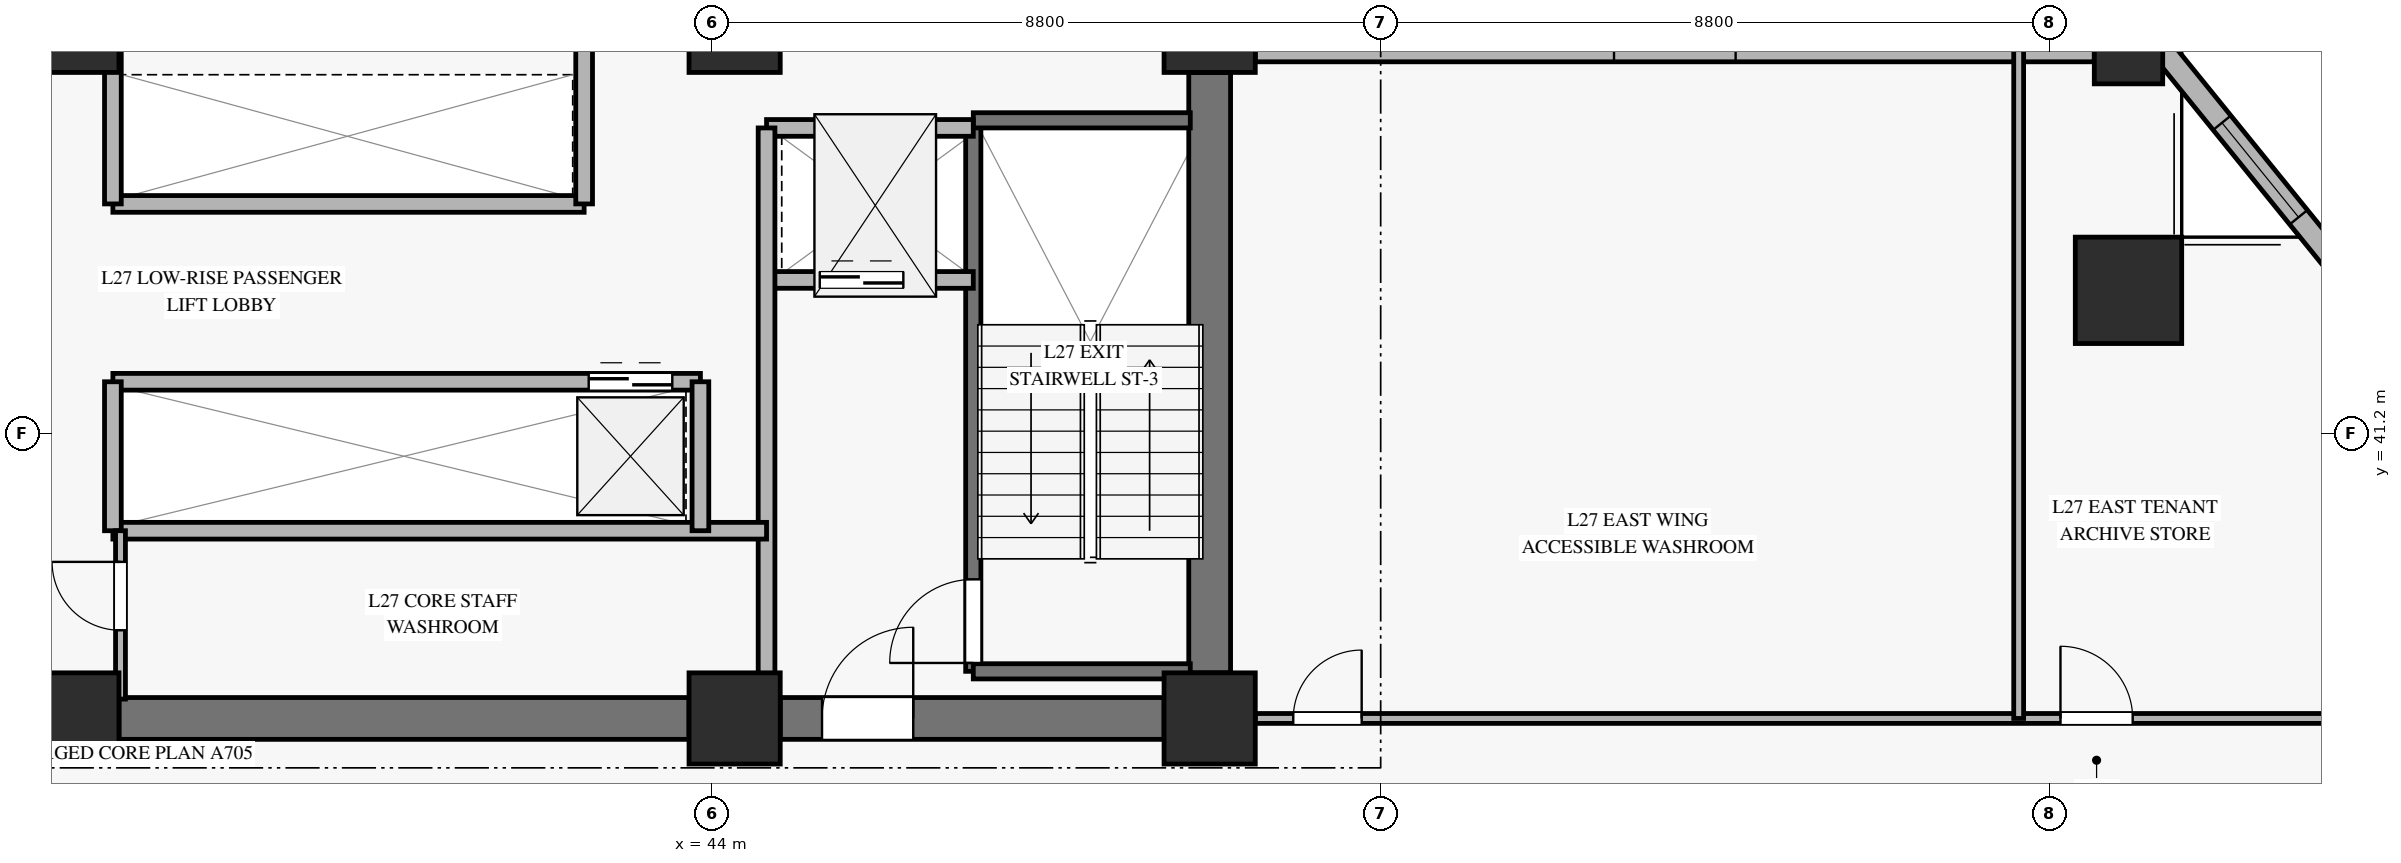
"""IFC4 building model, lengths in metres.
Left out: names, types, materials, properties, quantities, classifications, styles, units other than length and angle.
Written with IfcOpenShell. Run it as: python <this file> out.ifc"""

import sys

from ifc_helpers import new_model, si_unit, direction, frame, frame_2d, origin, origin_2d, place, context, subcontext, project, spatial, rectangle, hollow_rectangle, extrude, source, transform, mapped, element, fill, save


model = new_model("IFC4")
c1 = context("Model", 3, precision=1e-05, world=origin(), true_north=direction((0.0, 1.0)))
c2 = subcontext(c1, "Body", "Model", "MODEL_VIEW")
j1 = project(units=[si_unit("LENGTHUNIT", "METRE"), si_unit("PLANEANGLEUNIT", "RADIAN")], contexts=[c1])
p1 = place(None, origin())
s1 = spatial("IfcSite", under=j1, at=p1, CompositionType="ELEMENT")
p2 = place(p1, origin())
s2 = spatial("IfcBuilding", under=s1, at=p2, CompositionType="ELEMENT")
p3 = place(p2, frame((0.0, 0.0, 111.4)))
s3 = spatial("IfcBuildingStorey", under=s2, at=p3, CompositionType="ELEMENT", Elevation=111.4)
m1 = source(origin(), c2, "Body", "SweptSolid", [
    extrude(rectangle(XDim=1.2, YDim=1.2, at=origin_2d()), origin(), (0.0, 0.0, 1.0), 3.68),
])
for number, where, z_axis, x_axis in (
    (1, (35.6, 37.45, 0.0), (0.0, 0.0, 1.0), (1.0, 0.0, 0.0)),
    (2, (35.6, 46.55, 0.0), (0.0, 0.0, 1.0), (1.0, 0.0, 0.0)),
    (3, (44.3, 37.45, 0.0), (0.0, 0.0, 1.0), (1.0, 0.0, 0.0)),
    (4, (44.3, 46.55, 0.0), (0.0, 0.0, 1.0), (1.0, 0.0, 0.0)),
    (5, (50.55, 37.45, 0.0), (0.0, 0.0, 1.0), (1.0, 0.0, 0.0)),
    (6, (50.55, 46.55, 0.0), (0.0, 0.0, 1.0), (1.0, 0.0, 0.0)),
):
    element("IfcColumn", number, at=place(p3, frame(where, z_axis=z_axis, x_axis=x_axis)), inside=s3, PredefinedType="PILASTER", context=c2, shape_type="MappedRepresentation", body=[
        mapped(m1, transform((0.0, 0.0, 0.0), x_axis=(1.0, 0.0, 0.0), y_axis=(0.0, 1.0, 0.0), z_axis=(0.0, 0.0, 1.0), scale=1.0)),
    ])
p4 = place(p3, frame((36.2, 37.45, 0.0), z_axis=(0.0, 0.0, 1.0), x_axis=(1.0, 0.0, 0.0)))
e7 = element("IfcWall", 7, at=p4, inside=s3, PredefinedType="SHEAR", context=c2, shape_type="SweptSolid", body=[
    extrude(rectangle(XDim=7.5, YDim=0.55, at=frame_2d((3.75, 0.0))), origin(), (0.0, 0.0, 1.0), 3.68),
])
p5 = place(p3, frame((44.9, 37.45, 0.0), z_axis=(0.0, 0.0, 1.0), x_axis=(1.0, 0.0, 0.0)))
e8 = element("IfcWall", 8, at=p5, inside=s3, PredefinedType="SHEAR", context=c2, shape_type="SweptSolid", body=[
    extrude(rectangle(XDim=5.05, YDim=0.55, at=frame_2d((2.525, 0.0))), origin(), (0.0, 0.0, 1.0), 3.68),
])
p6 = place(p5, frame((0.55, 0.0, 0.0)))
e9 = element("IfcOpeningElement", 9, at=p6, cuts=e8, PredefinedType="OPENING", context=c2, shape_type="SweptSolid", body=[
    extrude(rectangle(XDim=1.2, YDim=2.15, at=frame_2d((0.6, 1.075))), frame((0.0, 0.285, 0.0), z_axis=(0.0, -1.0, 0.0), x_axis=(1.0, 0.0, 0.0)), (0.0, 0.0, 1.0), 0.57),
])
p7 = place(p3, frame((50.55, 38.05, 0.0), z_axis=(0.0, 0.0, 1.0), x_axis=(0.0, 1.0, 0.0)))
e10 = element("IfcWall", 10, at=p7, inside=s3, PredefinedType="SHEAR", context=c2, shape_type="SweptSolid", body=[
    extrude(rectangle(XDim=7.9, YDim=0.55, at=frame_2d((3.95, 0.0))), origin(), (0.0, 0.0, 1.0), 3.68),
])
m2 = source(origin(), c2, "Body", "SweptSolid", [
    extrude(hollow_rectangle(XDim=1.4, YDim=1.4, WallThickness=0.065, at=origin_2d()), origin(), (0.0, 0.0, 1.0), 3.68),
])
p8 = place(p3, frame((62.639, 43.083, 0.0), z_axis=(0.0, 0.0, 1.0), x_axis=(1.0, 0.0, 0.0)))
e11 = element("IfcColumn", 11, at=p8, inside=s3, PredefinedType="COLUMN", context=c2, shape_type="MappedRepresentation", body=[
    mapped(m2, transform((0.0, 0.0, 0.0), x_axis=(1.0, 0.0, 0.0), y_axis=(0.0, 1.0, 0.0), z_axis=(0.0, 0.0, 1.0), scale=1.0)),
])
m3 = source(origin(), c2, "Body", "SweptSolid", [
    extrude(hollow_rectangle(XDim=0.9, YDim=0.9, WallThickness=0.04, at=origin_2d()), origin(), (0.0, 0.0, 1.0), 3.68),
])
p9 = place(p3, frame((62.639, 46.25, 0.0), z_axis=(0.0, 0.0, 1.0), x_axis=(1.0, 0.0, 0.0)))
e12 = element("IfcColumn", 12, at=p9, inside=s3, PredefinedType="COLUMN", context=c2, shape_type="MappedRepresentation", body=[
    mapped(m3, transform((0.0, 0.0, 0.0), x_axis=(1.0, 0.0, 0.0), y_axis=(0.0, 1.0, 0.0), z_axis=(0.0, 0.0, 1.0), scale=1.0)),
])
p10 = place(p3, frame((51.15, 46.25, 0.0), z_axis=(0.0, 0.0, 1.0), x_axis=(1.0, 0.0, 0.0)))
e13 = element("IfcWall", 13, at=p10, inside=s3, PredefinedType="SOLIDWALL", context=c2, shape_type="SweptSolid", body=[
    extrude(rectangle(XDim=11.039, YDim=0.32, at=frame_2d((5.52, 0.0))), origin(), (0.0, 0.0, 1.0), 3.16),
])
p11 = place(p10, frame((4.72, 0.0, 0.45)))
e14 = element("IfcOpeningElement", 14, at=p11, cuts=e13, PredefinedType="OPENING", context=c2, shape_type="SweptSolid", body=[
    extrude(rectangle(XDim=1.6, YDim=2.0, at=frame_2d((0.8, 1.0))), frame((0.0, 0.17, 0.0), z_axis=(0.0, -1.0, 0.0), x_axis=(1.0, 0.0, 0.0)), (0.0, 0.0, 1.0), 0.34),
])
p12 = place(p3, frame((65.656, 43.083, 0.0), z_axis=(0.0, 0.0, 1.0), x_axis=(-0.629663274091, 0.776868174957, 0.0)))
e15 = element("IfcWall", 15, at=p12, inside=s3, PredefinedType="SOLIDWALL", context=c2, shape_type="SweptSolid", body=[
    extrude(rectangle(XDim=4.077, YDim=0.3, at=frame_2d((2.038, 0.0))), origin(), (0.0, 0.0, 1.0), 3.16),
])
p13 = place(p12, frame((1.238, 0.0, 0.45)))
e16 = element("IfcOpeningElement", 16, at=p13, cuts=e15, PredefinedType="OPENING", context=c2, shape_type="SweptSolid", body=[
    extrude(rectangle(XDim=1.6, YDim=2.0, at=frame_2d((0.8, 1.0))), frame((0.0, 0.16, 0.0), z_axis=(0.0, -1.0, 0.0), x_axis=(1.0, 0.0, 0.0)), (0.0, 0.0, 1.0), 0.32),
])
p14 = place(p3, frame((47.44, 38.07, 0.0), z_axis=(0.0, 0.0, 1.0), x_axis=(0.0, 1.0, 0.0)))
e17 = element("IfcWall", 17, at=p14, inside=s3, PredefinedType="SOLIDWALL", context=c2, shape_type="SweptSolid", body=[
    extrude(rectangle(XDim=7.25, YDim=0.2, at=frame_2d((3.625, 0.0))), origin(), (0.0, 0.0, 1.0), 3.9),
])
p15 = place(p14, frame((0.11, 0.0, 0.0)))
e18 = element("IfcOpeningElement", 18, at=p15, cuts=e17, PredefinedType="OPENING", context=c2, shape_type="SweptSolid", body=[
    extrude(rectangle(XDim=1.1, YDim=2.15, at=frame_2d((0.55, 1.075))), frame((0.0, 0.11, 0.0), z_axis=(0.0, -1.0, 0.0), x_axis=(1.0, 0.0, 0.0)), (0.0, 0.0, 1.0), 0.22),
])
for number, where, z_axis, x_axis in (
    (19, (47.44, 45.32, 0.0), (0.0, 0.0, 1.0), (1.0, 0.0, 0.0)),
    (20, (47.44, 38.07, 0.0), (0.0, 0.0, 1.0), (1.0, 0.0, 0.0)),
):
    element("IfcWall", number, at=place(p3, frame(where, z_axis=z_axis, x_axis=x_axis)), inside=s3, PredefinedType="SOLIDWALL", context=c2, shape_type="SweptSolid", body=[
        extrude(rectangle(XDim=2.855, YDim=0.2, at=frame_2d((1.427, 0.0))), origin(), (0.0, 0.0, 1.0), 3.9),
    ])
p16 = place(p3, frame((44.72, 43.22, 0.0), z_axis=(0.0, 0.0, 1.0), x_axis=(1.0, 0.0, 0.0)))
e21 = element("IfcWall", 21, at=p16, inside=s3, PredefinedType="SOLIDWALL", context=c2, shape_type="SweptSolid", body=[
    extrude(rectangle(XDim=2.72, YDim=0.22, at=frame_2d((1.36, 0.0))), origin(), (0.0, 0.0, 1.0), 3.68),
])
p17 = place(p16, frame((0.7, 0.0, 0.0)))
e22 = element("IfcOpeningElement", 22, at=p17, cuts=e21, PredefinedType="OPENING", context=c2, shape_type="SweptSolid", body=[
    extrude(rectangle(XDim=1.1, YDim=2.2, at=frame_2d((0.55, 1.1))), frame((0.0, 0.12, 0.0), z_axis=(0.0, -1.0, 0.0), x_axis=(1.0, 0.0, 0.0)), (0.0, 0.0, 1.0), 0.24),
])
p18 = place(p3, frame((44.72, 45.22, 0.0), z_axis=(0.0, 0.0, 1.0), x_axis=(1.0, 0.0, 0.0)))
e23 = element("IfcWall", 23, at=p18, inside=s3, PredefinedType="SOLIDWALL", context=c2, shape_type="SweptSolid", body=[
    extrude(rectangle(XDim=2.72, YDim=0.22, at=frame_2d((1.36, 0.0))), origin(), (0.0, 0.0, 1.0), 3.68),
])
p19 = place(p3, frame((44.72, 37.705, 0.0), z_axis=(0.0, 0.0, 1.0), x_axis=(0.0, 1.0, 0.0)))
e24 = element("IfcWall", 24, at=p19, inside=s3, PredefinedType="SOLIDWALL", context=c2, shape_type="SweptSolid", body=[
    extrude(rectangle(XDim=7.515, YDim=0.22, at=frame_2d((3.757, 0.0))), origin(), (0.0, 0.0, 1.0), 3.68),
])
p20 = place(p3, frame((36.12, 44.22, 0.0), z_axis=(0.0, 0.0, 1.0), x_axis=(1.0, 0.0, 0.0)))
e25 = element("IfcWall", 25, at=p20, inside=s3, PredefinedType="SOLIDWALL", context=c2, shape_type="SweptSolid", body=[
    extrude(rectangle(XDim=6.2, YDim=0.22, at=frame_2d((3.1, 0.0))), origin(), (0.0, 0.0, 1.0), 3.68),
])
for number, where, z_axis, x_axis in (
    (26, (36.12, 44.22, 0.0), (0.0, 0.0, 1.0), (0.0, 1.0, 0.0)),
    (27, (42.32, 44.22, 0.0), (0.0, 0.0, 1.0), (0.0, 1.0, 0.0)),
):
    element("IfcWall", number, at=place(p3, frame(where, z_axis=z_axis, x_axis=x_axis)), inside=s3, PredefinedType="SOLIDWALL", context=c2, shape_type="SweptSolid", body=[
        extrude(rectangle(XDim=2.075, YDim=0.22, at=frame_2d((1.038, 0.0))), origin(), (0.0, 0.0, 1.0), 3.68),
    ])
p21 = place(p3, frame((36.12, 41.88, 0.0), z_axis=(0.0, 0.0, 1.0), x_axis=(1.0, 0.0, 0.0)))
e28 = element("IfcWall", 28, at=p21, inside=s3, PredefinedType="SOLIDWALL", context=c2, shape_type="SweptSolid", body=[
    extrude(rectangle(XDim=7.73, YDim=0.22, at=frame_2d((3.865, 0.0))), origin(), (0.0, 0.0, 1.0), 3.68),
])
p22 = place(p21, frame((6.26, 0.0, 0.0)))
e29 = element("IfcOpeningElement", 29, at=p22, cuts=e28, PredefinedType="OPENING", context=c2, shape_type="SweptSolid", body=[
    extrude(rectangle(XDim=1.1, YDim=2.2, at=frame_2d((0.55, 1.1))), frame((0.0, 0.12, 0.0), z_axis=(0.0, -1.0, 0.0), x_axis=(1.0, 0.0, 0.0)), (0.0, 0.0, 1.0), 0.24),
])
p23 = place(p3, frame((36.12, 39.92, 0.0), z_axis=(0.0, 0.0, 1.0), x_axis=(1.0, 0.0, 0.0)))
e30 = element("IfcWall", 30, at=p23, inside=s3, PredefinedType="SOLIDWALL", context=c2, shape_type="SweptSolid", body=[
    extrude(rectangle(XDim=8.6, YDim=0.22, at=frame_2d((4.3, 0.0))), origin(), (0.0, 0.0, 1.0), 2.965),
])
for number, where, z_axis, x_axis in (
    (31, (36.12, 39.92, 0.0), (0.0, 0.0, 1.0), (0.0, 1.0, 0.0)),
    (32, (43.85, 39.92, 0.0), (0.0, 0.0, 1.0), (0.0, 1.0, 0.0)),
):
    element("IfcWall", number, at=place(p3, frame(where, z_axis=z_axis, x_axis=x_axis)), inside=s3, PredefinedType="SOLIDWALL", context=c2, shape_type="SweptSolid", body=[
        extrude(rectangle(XDim=1.96, YDim=0.22, at=frame_2d((0.98, 0.0))), origin(), (0.0, 0.0, 1.0), 3.68),
    ])
p24 = place(p3, frame((36.22, 37.705, 0.0), z_axis=(0.0, 0.0, 1.0), x_axis=(0.0, 1.0, 0.0)))
e33 = element("IfcWall", 33, at=p24, inside=s3, PredefinedType="PARTITIONING", context=c2, shape_type="SweptSolid", body=[
    extrude(rectangle(XDim=2.215, YDim=0.13, at=frame_2d((1.107, 0.0))), origin(), (0.0, 0.0, 1.0), 3.68),
])
p25 = place(p24, frame((0.905, 0.0, 0.0)))
e34 = element("IfcOpeningElement", 34, at=p25, cuts=e33, PredefinedType="OPENING", context=c2, shape_type="SweptSolid", body=[
    extrude(rectangle(XDim=0.9, YDim=2.1, at=frame_2d((0.45, 1.05))), frame((0.0, 0.075, 0.0), z_axis=(0.0, -1.0, 0.0), x_axis=(1.0, 0.0, 0.0)), (0.0, 0.0, 1.0), 0.15),
])
p26 = place(p3, frame((51.15, 37.45, 0.0), z_axis=(0.0, 0.0, 1.0), x_axis=(1.0, 0.0, 0.0)))
e35 = element("IfcWall", 35, at=p26, inside=s3, PredefinedType="PARTITIONING", context=c2, shape_type="SweptSolid", body=[
    extrude(rectangle(XDim=14.506, YDim=0.13, at=frame_2d((7.253, 0.0))), origin(), (0.0, 0.0, 1.0), 3.165),
])
p27 = place(p26, frame((0.5, 0.0, 0.0)))
e36 = element("IfcOpeningElement", 36, at=p27, cuts=e35, PredefinedType="OPENING", context=c2, shape_type="SweptSolid", body=[
    extrude(rectangle(XDim=0.9, YDim=2.1, at=frame_2d((0.45, 1.05))), frame((0.0, 0.075, 0.0), z_axis=(0.0, -1.0, 0.0), x_axis=(1.0, 0.0, 0.0)), (0.0, 0.0, 1.0), 0.15),
])
p28 = place(p26, frame((10.594, 0.0, 0.0)))
e37 = element("IfcOpeningElement", 37, at=p28, cuts=e35, PredefinedType="OPENING", context=c2, shape_type="SweptSolid", body=[
    extrude(rectangle(XDim=0.95, YDim=2.1, at=frame_2d((0.475, 1.05))), frame((0.0, 0.075, 0.0), z_axis=(0.0, -1.0, 0.0), x_axis=(1.0, 0.0, 0.0)), (0.0, 0.0, 1.0), 0.15),
])
p29 = place(p3, frame((61.194, 37.45, 0.0), z_axis=(0.0, 0.0, 1.0), x_axis=(0.0, 1.0, 0.0)))
e38 = element("IfcWall", 38, at=p29, inside=s3, PredefinedType="PARTITIONING", context=c2, shape_type="SweptSolid", body=[
    extrude(rectangle(XDim=8.8, YDim=0.13, at=frame_2d((4.4, 0.0))), origin(), (0.0, 0.0, 1.0), 3.68),
])
m4 = source(origin(), c2, "Body", "SweptSolid", [
    extrude(rectangle(XDim=1.6, YDim=2.0, at=frame_2d((0.8, 1.0))), frame((0.0, 0.03, 0.0), z_axis=(0.0, -1.0, 0.0), x_axis=(1.0, 0.0, 0.0)), (0.0, 0.0, 1.0), 0.06),
])
p30 = place(p13, origin())
e39 = element("IfcWindow", 39, at=p30, inside=s3, PartitioningType="SINGLE_PANEL", PredefinedType="WINDOW", context=c2, shape_type="MappedRepresentation", body=[
    mapped(m4, transform((0.0, 0.0, 0.0), x_axis=(1.0, 0.0, 0.0), y_axis=(0.0, 1.0, 0.0), z_axis=(0.0, 0.0, 1.0), scale=1.0)),
])
fill(e16, e39)
m5 = source(origin(), c2, "Body", "SweptSolid", [
    extrude(rectangle(XDim=1.1, YDim=2.15, at=frame_2d((0.55, 1.075))), frame((0.0, 0.025, 0.0), z_axis=(0.0, -1.0, 0.0), x_axis=(1.0, 0.0, 0.0)), (0.0, 0.0, 1.0), 0.05),
])
p31 = place(p15, origin())
e40 = element("IfcDoor", 40, at=p31, inside=s3, OperationType="SINGLE_SWING_LEFT", PredefinedType="DOOR", context=c2, shape_type="MappedRepresentation", body=[
    mapped(m5, transform((0.0, 0.0, 0.0), x_axis=(1.0, 0.0, 0.0), y_axis=(0.0, 1.0, 0.0), z_axis=(0.0, 0.0, 1.0), scale=1.0)),
])
fill(e18, e40)
m6 = source(origin(), c2, "Body", "SweptSolid", [
    extrude(rectangle(XDim=1.1, YDim=2.2, at=frame_2d((0.55, 1.1))), frame((0.0, 0.025, 0.0), z_axis=(0.0, -1.0, 0.0), x_axis=(1.0, 0.0, 0.0)), (0.0, 0.0, 1.0), 0.05),
])
p32 = place(p17, origin())
e41 = element("IfcDoor", 41, at=p32, inside=s3, OperationType="SLIDING_TO_LEFT", PredefinedType="DOOR", context=c2, shape_type="MappedRepresentation", body=[
    mapped(m6, transform((0.0, 0.0, 0.0), x_axis=(1.0, 0.0, 0.0), y_axis=(0.0, 1.0, 0.0), z_axis=(0.0, 0.0, 1.0), scale=1.0)),
])
fill(e22, e41)
m7 = source(origin(), c2, "Body", "SweptSolid", [
    extrude(rectangle(XDim=1.2, YDim=2.15, at=frame_2d((0.6, 1.075))), frame((0.0, 0.025, 0.0), z_axis=(0.0, -1.0, 0.0), x_axis=(1.0, 0.0, 0.0)), (0.0, 0.0, 1.0), 0.05),
])
p33 = place(p6, origin())
e42 = element("IfcDoor", 42, at=p33, inside=s3, OperationType="SINGLE_SWING_RIGHT", PredefinedType="DOOR", context=c2, shape_type="MappedRepresentation", body=[
    mapped(m7, transform((0.0, 0.0, 0.0), x_axis=(1.0, 0.0, 0.0), y_axis=(0.0, 1.0, 0.0), z_axis=(0.0, 0.0, 1.0), scale=1.0)),
])
fill(e9, e42)
p34 = place(p22, origin())
e43 = element("IfcDoor", 43, at=p34, inside=s3, OperationType="SLIDING_TO_LEFT", PredefinedType="DOOR", context=c2, shape_type="MappedRepresentation", body=[
    mapped(m6, transform((0.0, 0.0, 0.0), x_axis=(1.0, 0.0, 0.0), y_axis=(0.0, 1.0, 0.0), z_axis=(0.0, 0.0, 1.0), scale=1.0)),
])
fill(e29, e43)
m8 = source(origin(), c2, "Body", "SweptSolid", [
    extrude(rectangle(XDim=0.9, YDim=2.1, at=frame_2d((0.45, 1.05))), frame((0.0, 0.025, 0.0), z_axis=(0.0, -1.0, 0.0), x_axis=(1.0, 0.0, 0.0)), (0.0, 0.0, 1.0), 0.05),
])
p35 = place(p25, origin())
e44 = element("IfcDoor", 44, at=p35, inside=s3, OperationType="SINGLE_SWING_RIGHT", PredefinedType="DOOR", context=c2, shape_type="MappedRepresentation", body=[
    mapped(m8, transform((0.0, 0.0, 0.0), x_axis=(1.0, 0.0, 0.0), y_axis=(0.0, 1.0, 0.0), z_axis=(0.0, 0.0, 1.0), scale=1.0)),
])
fill(e34, e44)
p36 = place(p27, origin())
e45 = element("IfcDoor", 45, at=p36, inside=s3, OperationType="SINGLE_SWING_RIGHT", PredefinedType="DOOR", context=c2, shape_type="MappedRepresentation", body=[
    mapped(m8, transform((0.0, 0.0, 0.0), x_axis=(1.0, 0.0, 0.0), y_axis=(0.0, 1.0, 0.0), z_axis=(0.0, 0.0, 1.0), scale=1.0)),
])
fill(e36, e45)
m9 = source(origin(), c2, "Body", "SweptSolid", [
    extrude(rectangle(XDim=0.95, YDim=2.1, at=frame_2d((0.475, 1.05))), frame((0.0, 0.025, 0.0), z_axis=(0.0, -1.0, 0.0), x_axis=(1.0, 0.0, 0.0)), (0.0, 0.0, 1.0), 0.05),
])
p37 = place(p28, origin())
e46 = element("IfcDoor", 46, at=p37, inside=s3, OperationType="SINGLE_SWING_LEFT", PredefinedType="DOOR", context=c2, shape_type="MappedRepresentation", body=[
    mapped(m9, transform((0.0, 0.0, 0.0), x_axis=(1.0, 0.0, 0.0), y_axis=(0.0, 1.0, 0.0), z_axis=(0.0, 0.0, 1.0), scale=1.0)),
])
fill(e37, e46)
save(model, sys.argv[1])
